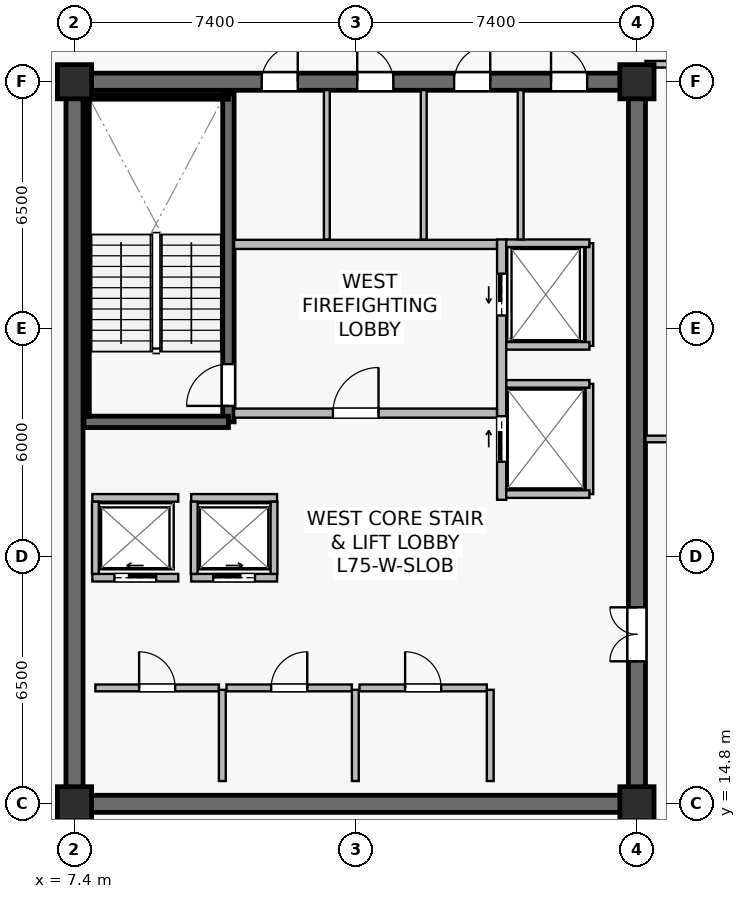
"""IFC4 building model, lengths in metres.
Left out: names, types, materials, properties, quantities, classifications, styles, units other than length and angle.
Written with IfcOpenShell. Run it as: python <this file> out.ifc"""

import sys

from ifc_helpers import new_model, si_unit, direction, frame, frame_2d, origin, origin_2d, place, context, subcontext, project, spatial, rectangle, extrude, source, transform, mapped, element, fill, save


model = new_model("IFC4")
c1 = context("Model", 3, precision=1e-05, world=origin(), true_north=direction((0.0, 1.0)))
c2 = subcontext(c1, "Body", "Model", "MODEL_VIEW")
j1 = project(units=[si_unit("LENGTHUNIT", "METRE"), si_unit("PLANEANGLEUNIT", "RADIAN")], contexts=[c1])
p1 = place(None, origin())
s1 = spatial("IfcSite", under=j1, at=p1, CompositionType="ELEMENT")
p2 = place(p1, origin())
s2 = spatial("IfcBuilding", under=s1, at=p2, CompositionType="ELEMENT")
p3 = place(p2, frame((0.0, 0.0, 314.4)))
s3 = spatial("IfcBuildingStorey", under=s2, at=p3, CompositionType="ELEMENT", Elevation=314.4)
p4 = place(p3, frame((7.175, 14.8, 0.0), z_axis=(0.0, 0.0, 1.0), x_axis=(1.0, 0.0, 0.0)))
e1 = element("IfcWall", 1, at=p4, inside=s3, PredefinedType="SHEAR", context=c2, shape_type="SweptSolid", body=[
    extrude(rectangle(XDim=15.25, YDim=0.45, at=frame_2d((7.625, 0.0))), origin(), (0.0, 0.0, 1.0), 3.9),
])
p5 = place(p3, frame((7.175, 33.8, 0.0), z_axis=(0.0, 0.0, 1.0), x_axis=(1.0, 0.0, 0.0)))
e2 = element("IfcWall", 2, at=p5, inside=s3, PredefinedType="SHEAR", context=c2, shape_type="SweptSolid", body=[
    extrude(rectangle(XDim=15.25, YDim=0.45, at=frame_2d((7.625, 0.0))), origin(), (0.0, 0.0, 1.0), 3.9),
])
p6 = place(p5, frame((5.15, 0.0, 0.0)))
e3 = element("IfcOpeningElement", 3, at=p6, cuts=e2, PredefinedType="OPENING", context=c2, shape_type="SweptSolid", body=[
    extrude(rectangle(XDim=0.95, YDim=2.15, at=frame_2d((0.475, 1.075))), frame((0.0, 0.235, 0.0), z_axis=(0.0, -1.0, 0.0), x_axis=(1.0, 0.0, 0.0)), (0.0, 0.0, 1.0), 0.47),
])
p7 = place(p5, frame((7.665, 0.0, 0.0)))
e4 = element("IfcOpeningElement", 4, at=p7, cuts=e2, PredefinedType="OPENING", context=c2, shape_type="SweptSolid", body=[
    extrude(rectangle(XDim=0.95, YDim=2.15, at=frame_2d((0.475, 1.075))), frame((0.0, 0.235, 0.0), z_axis=(0.0, -1.0, 0.0), x_axis=(1.0, 0.0, 0.0)), (0.0, 0.0, 1.0), 0.47),
])
p8 = place(p5, frame((10.215, 0.0, 0.0)))
e5 = element("IfcOpeningElement", 5, at=p8, cuts=e2, PredefinedType="OPENING", context=c2, shape_type="SweptSolid", body=[
    extrude(rectangle(XDim=0.95, YDim=2.15, at=frame_2d((0.475, 1.075))), frame((0.0, 0.235, 0.0), z_axis=(0.0, -1.0, 0.0), x_axis=(1.0, 0.0, 0.0)), (0.0, 0.0, 1.0), 0.47),
])
p9 = place(p5, frame((12.765, 0.0, 0.0)))
e6 = element("IfcOpeningElement", 6, at=p9, cuts=e2, PredefinedType="OPENING", context=c2, shape_type="SweptSolid", body=[
    extrude(rectangle(XDim=0.95, YDim=2.15, at=frame_2d((0.475, 1.075))), frame((0.0, 0.235, 0.0), z_axis=(0.0, -1.0, 0.0), x_axis=(1.0, 0.0, 0.0)), (0.0, 0.0, 1.0), 0.47),
])
p10 = place(p3, frame((7.4, 15.025, 0.0), z_axis=(0.0, 0.0, 1.0), x_axis=(0.0, 1.0, 0.0)))
e7 = element("IfcWall", 7, at=p10, inside=s3, PredefinedType="SHEAR", context=c2, shape_type="SweptSolid", body=[
    extrude(rectangle(XDim=18.55, YDim=0.45, at=frame_2d((9.275, 0.0))), origin(), (0.0, 0.0, 1.0), 3.9),
])
p11 = place(p3, frame((22.2, 15.025, 0.0), z_axis=(0.0, 0.0, 1.0), x_axis=(0.0, 1.0, 0.0)))
e8 = element("IfcWall", 8, at=p11, inside=s3, PredefinedType="SHEAR", context=c2, shape_type="SweptSolid", body=[
    extrude(rectangle(XDim=18.55, YDim=0.45, at=frame_2d((9.275, 0.0))), origin(), (0.0, 0.0, 1.0), 3.9),
])
p12 = place(p11, frame((3.525, 0.0, 0.0)))
e9 = element("IfcOpeningElement", 9, at=p12, cuts=e8, PredefinedType="OPENING", context=c2, shape_type="SweptSolid", body=[
    extrude(rectangle(XDim=1.42, YDim=2.2, at=frame_2d((0.71, 1.1))), frame((0.0, 0.235, 0.0), z_axis=(0.0, -1.0, 0.0), x_axis=(1.0, 0.0, 0.0)), (0.0, 0.0, 1.0), 0.47),
])
p13 = place(p3, frame((11.45, 24.85, 0.0), z_axis=(0.0, 0.0, 1.0), x_axis=(0.0, 1.0, 0.0)))
e10 = element("IfcWall", 10, at=p13, inside=s3, PredefinedType="SHEAR", context=c2, shape_type="SweptSolid", body=[
    extrude(rectangle(XDim=8.63, YDim=0.3, at=frame_2d((4.315, 0.0))), origin(), (0.0, 0.0, 1.0), 3.9),
])
p14 = place(p13, frame((0.42, 0.0, 0.0)))
e11 = element("IfcOpeningElement", 11, at=p14, cuts=e10, PredefinedType="OPENING", context=c2, shape_type="SweptSolid", body=[
    extrude(rectangle(XDim=1.1, YDim=2.15, at=frame_2d((0.55, 1.075))), frame((0.0, 0.16, 0.0), z_axis=(0.0, -1.0, 0.0), x_axis=(1.0, 0.0, 0.0)), (0.0, 0.0, 1.0), 0.32),
])
p15 = place(p3, frame((7.65, 24.85, 0.0), z_axis=(0.0, 0.0, 1.0), x_axis=(1.0, 0.0, 0.0)))
e12 = element("IfcWall", 12, at=p15, inside=s3, PredefinedType="SHEAR", context=c2, shape_type="SweptSolid", body=[
    extrude(rectangle(XDim=3.8, YDim=0.3, at=frame_2d((1.9, 0.0))), origin(), (0.0, 0.0, 1.0), 3.9),
])
p16 = place(p3, frame((7.73, 33.4, 0.0), z_axis=(0.0, 0.0, 1.0), x_axis=(1.0, 0.0, 0.0)))
e13 = element("IfcWall", 13, at=p16, inside=s3, PredefinedType="SOLIDWALL", context=c2, shape_type="SweptSolid", body=[
    extrude(rectangle(XDim=3.72, YDim=0.12, at=frame_2d((1.86, 0.0))), origin(), (0.0, 0.0, 1.0), 3.9),
])
p17 = place(p3, frame((7.73, 25.0, 0.0), z_axis=(0.0, 0.0, 1.0), x_axis=(0.0, 1.0, 0.0)))
e14 = element("IfcWall", 14, at=p17, inside=s3, PredefinedType="SOLIDWALL", context=c2, shape_type="SweptSolid", body=[
    extrude(rectangle(XDim=8.32, YDim=0.12, at=frame_2d((4.16, 0.0))), origin(), (0.0, 0.0, 1.0), 3.9),
])
m1 = source(origin(), c2, "Body", "SweptSolid", [
    extrude(rectangle(XDim=0.9, YDim=0.9, at=origin_2d()), origin(), (0.0, 0.0, 1.0), 4.2),
])
for number, where, z_axis, x_axis in (
    (15, (7.4, 14.8, 0.0), (0.0, 0.0, 1.0), (1.0, 0.0, 0.0)),
    (16, (22.2, 14.8, 0.0), (0.0, 0.0, 1.0), (1.0, 0.0, 0.0)),
    (17, (7.4, 33.8, 0.0), (0.0, 0.0, 1.0), (1.0, 0.0, 0.0)),
    (18, (22.2, 33.8, 0.0), (0.0, 0.0, 1.0), (1.0, 0.0, 0.0)),
):
    element("IfcColumn", number, at=place(p3, frame(where, z_axis=z_axis, x_axis=x_axis)), inside=s3, PredefinedType="COLUMN", context=c2, shape_type="MappedRepresentation", body=[
        mapped(m1, transform((0.0, 0.0, 0.0), scale=1.0)),
    ])
p18 = place(p3, frame((11.6, 25.08, 0.0), z_axis=(0.0, 0.0, 1.0), x_axis=(1.0, 0.0, 0.0)))
e19 = element("IfcWall", 19, at=p18, inside=s3, PredefinedType="SOLIDWALL", context=c2, shape_type="SweptSolid", body=[
    extrude(rectangle(XDim=6.92, YDim=0.24, at=frame_2d((3.46, 0.0))), origin(), (0.0, 0.0, 1.0), 3.297),
])
p19 = place(p18, frame((2.6, 0.0, 0.0)))
e20 = element("IfcOpeningElement", 20, at=p19, cuts=e19, PredefinedType="OPENING", context=c2, shape_type="SweptSolid", body=[
    extrude(rectangle(XDim=1.2, YDim=2.16, at=frame_2d((0.6, 1.08))), frame((0.0, 0.13, 0.0), z_axis=(0.0, -1.0, 0.0), x_axis=(1.0, 0.0, 0.0)), (0.0, 0.0, 1.0), 0.26),
])
p20 = place(p3, frame((11.6, 29.52, 0.0), z_axis=(0.0, 0.0, 1.0), x_axis=(1.0, 0.0, 0.0)))
e21 = element("IfcWall", 21, at=p20, inside=s3, PredefinedType="SOLIDWALL", context=c2, shape_type="SweptSolid", body=[
    extrude(rectangle(XDim=6.92, YDim=0.24, at=frame_2d((3.46, 0.0))), origin(), (0.0, 0.0, 1.0), 3.297),
])
p21 = place(p3, frame((18.64, 22.8, 0.0), z_axis=(0.0, 0.0, 1.0), x_axis=(0.0, 1.0, 0.0)))
e22 = element("IfcWall", 22, at=p21, inside=s3, PredefinedType="SOLIDWALL", context=c2, shape_type="SweptSolid", body=[
    extrude(rectangle(XDim=6.85, YDim=0.24, at=frame_2d((3.425, 0.0))), origin(), (0.0, 0.0, 1.0), 3.035),
])
p22 = place(p21, frame((4.85, 0.0, 0.0)))
e23 = element("IfcOpeningElement", 23, at=p22, cuts=e22, PredefinedType="OPENING", context=c2, shape_type="SweptSolid", body=[
    extrude(rectangle(XDim=1.1, YDim=2.22, at=frame_2d((0.55, 1.11))), frame((0.0, 0.13, 0.0), z_axis=(0.0, -1.0, 0.0), x_axis=(1.0, 0.0, 0.0)), (0.0, 0.0, 1.0), 0.26),
])
p23 = place(p21, frame((1.0, 0.0, 0.0)))
e24 = element("IfcOpeningElement", 24, at=p23, cuts=e22, PredefinedType="OPENING", context=c2, shape_type="SweptSolid", body=[
    extrude(rectangle(XDim=1.2, YDim=2.22, at=frame_2d((0.6, 1.11))), frame((0.0, 0.13, 0.0), z_axis=(0.0, -1.0, 0.0), x_axis=(1.0, 0.0, 0.0)), (0.0, 0.0, 1.0), 0.26),
])
p24 = place(p3, frame((7.87, 20.75, 0.0), z_axis=(0.0, 0.0, 1.0), x_axis=(1.0, 0.0, 0.0)))
e25 = element("IfcWall", 25, at=p24, inside=s3, PredefinedType="SOLIDWALL", context=c2, shape_type="SweptSolid", body=[
    extrude(rectangle(XDim=2.26, YDim=0.2, at=frame_2d((1.13, 0.0))), origin(), (0.0, 0.0, 1.0), 3.9),
])
p25 = place(p24, frame((0.58, 0.0, 0.0)))
e26 = element("IfcOpeningElement", 26, at=p25, cuts=e25, PredefinedType="OPENING", context=c2, shape_type="SweptSolid", body=[
    extrude(rectangle(XDim=1.1, YDim=2.22, at=frame_2d((0.55, 1.11))), frame((0.0, 0.11, 0.0), z_axis=(0.0, -1.0, 0.0), x_axis=(1.0, 0.0, 0.0)), (0.0, 0.0, 1.0), 0.22),
])
p26 = place(p3, frame((7.87, 22.85, 0.0), z_axis=(0.0, 0.0, 1.0), x_axis=(1.0, 0.0, 0.0)))
e27 = element("IfcWall", 27, at=p26, inside=s3, PredefinedType="SOLIDWALL", context=c2, shape_type="SweptSolid", body=[
    extrude(rectangle(XDim=2.26, YDim=0.2, at=frame_2d((1.13, 0.0))), origin(), (0.0, 0.0, 1.0), 3.9),
])
p27 = place(p3, frame((7.95, 20.85, 0.0), z_axis=(0.0, 0.0, 1.0), x_axis=(0.0, 1.0, 0.0)))
e28 = element("IfcWall", 28, at=p27, inside=s3, PredefinedType="SOLIDWALL", context=c2, shape_type="SweptSolid", body=[
    extrude(rectangle(XDim=1.9, YDim=0.18, at=frame_2d((0.95, 0.0))), origin(), (0.0, 0.0, 1.0), 3.9),
])
p28 = place(p3, frame((10.47, 20.75, 0.0), z_axis=(0.0, 0.0, 1.0), x_axis=(1.0, 0.0, 0.0)))
e29 = element("IfcWall", 29, at=p28, inside=s3, PredefinedType="SOLIDWALL", context=c2, shape_type="SweptSolid", body=[
    extrude(rectangle(XDim=2.26, YDim=0.2, at=frame_2d((1.13, 0.0))), origin(), (0.0, 0.0, 1.0), 3.9),
])
p29 = place(p28, frame((0.58, 0.0, 0.0)))
e30 = element("IfcOpeningElement", 30, at=p29, cuts=e29, PredefinedType="OPENING", context=c2, shape_type="SweptSolid", body=[
    extrude(rectangle(XDim=1.1, YDim=2.22, at=frame_2d((0.55, 1.11))), frame((0.0, 0.11, 0.0), z_axis=(0.0, -1.0, 0.0), x_axis=(1.0, 0.0, 0.0)), (0.0, 0.0, 1.0), 0.22),
])
p30 = place(p3, frame((10.47, 22.85, 0.0), z_axis=(0.0, 0.0, 1.0), x_axis=(1.0, 0.0, 0.0)))
e31 = element("IfcWall", 31, at=p30, inside=s3, PredefinedType="SOLIDWALL", context=c2, shape_type="SweptSolid", body=[
    extrude(rectangle(XDim=2.26, YDim=0.2, at=frame_2d((1.13, 0.0))), origin(), (0.0, 0.0, 1.0), 3.9),
])
for number, where, z_axis, x_axis in (
    (32, (10.55, 20.85, 0.0), (0.0, 0.0, 1.0), (0.0, 1.0, 0.0)),
    (33, (12.65, 20.85, 0.0), (0.0, 0.0, 1.0), (0.0, 1.0, 0.0)),
):
    element("IfcWall", number, at=place(p3, frame(where, z_axis=z_axis, x_axis=x_axis)), inside=s3, PredefinedType="SOLIDWALL", context=c2, shape_type="SweptSolid", body=[
        extrude(rectangle(XDim=1.9, YDim=0.18, at=frame_2d((0.95, 0.0))), origin(), (0.0, 0.0, 1.0), 3.9),
    ])
p31 = place(p3, frame((20.95, 26.85, 0.0), z_axis=(0.0, 0.0, 1.0), x_axis=(0.0, 1.0, 0.0)))
e34 = element("IfcWall", 34, at=p31, inside=s3, PredefinedType="SOLIDWALL", context=c2, shape_type="SweptSolid", body=[
    extrude(rectangle(XDim=2.7, YDim=0.2, at=frame_2d((1.35, 0.0))), origin(), (0.0, 0.0, 1.0), 3.9),
])
p32 = place(p3, frame((18.76, 29.55, 0.0), z_axis=(0.0, 0.0, 1.0), x_axis=(1.0, 0.0, 0.0)))
e35 = element("IfcWall", 35, at=p32, inside=s3, PredefinedType="SOLIDWALL", context=c2, shape_type="SweptSolid", body=[
    extrude(rectangle(XDim=2.19, YDim=0.2, at=frame_2d((1.095, 0.0))), origin(), (0.0, 0.0, 1.0), 3.9),
])
p33 = place(p3, frame((18.76, 26.85, 0.0), z_axis=(0.0, 0.0, 1.0), x_axis=(1.0, 0.0, 0.0)))
e36 = element("IfcWall", 36, at=p33, inside=s3, PredefinedType="SOLIDWALL", context=c2, shape_type="SweptSolid", body=[
    extrude(rectangle(XDim=2.19, YDim=0.2, at=frame_2d((1.095, 0.0))), origin(), (0.0, 0.0, 1.0), 3.297),
])
p34 = place(p3, frame((20.95, 22.95, 0.0), z_axis=(0.0, 0.0, 1.0), x_axis=(0.0, 1.0, 0.0)))
e37 = element("IfcWall", 37, at=p34, inside=s3, PredefinedType="SOLIDWALL", context=c2, shape_type="SweptSolid", body=[
    extrude(rectangle(XDim=2.9, YDim=0.2, at=frame_2d((1.45, 0.0))), origin(), (0.0, 0.0, 1.0), 3.035),
])
for number, where, z_axis, x_axis in (
    (38, (18.76, 25.85, 0.0), (0.0, 0.0, 1.0), (1.0, 0.0, 0.0)),
    (39, (18.76, 22.95, 0.0), (0.0, 0.0, 1.0), (1.0, 0.0, 0.0)),
):
    element("IfcWall", number, at=place(p3, frame(where, z_axis=z_axis, x_axis=x_axis)), inside=s3, PredefinedType="SOLIDWALL", context=c2, shape_type="SweptSolid", body=[
        extrude(rectangle(XDim=2.19, YDim=0.2, at=frame_2d((1.095, 0.0))), origin(), (0.0, 0.0, 1.0), 3.9),
    ])
p35 = place(p3, frame((7.95, 17.85, 0.0), z_axis=(0.0, 0.0, 1.0), x_axis=(1.0, 0.0, 0.0)))
e40 = element("IfcWall", 40, at=p35, inside=s3, PredefinedType="SOLIDWALL", context=c2, shape_type="SweptSolid", body=[
    extrude(rectangle(XDim=3.25, YDim=0.18, at=frame_2d((1.625, 0.0))), origin(), (0.0, 0.0, 1.0), 3.9),
])
p36 = place(p35, frame((1.15, 0.0, 0.0)))
e41 = element("IfcOpeningElement", 41, at=p36, cuts=e40, PredefinedType="OPENING", context=c2, shape_type="SweptSolid", body=[
    extrude(rectangle(XDim=0.95, YDim=2.15, at=frame_2d((0.475, 1.075))), frame((0.0, 0.1, 0.0), z_axis=(0.0, -1.0, 0.0), x_axis=(1.0, 0.0, 0.0)), (0.0, 0.0, 1.0), 0.2),
])
p37 = place(p3, frame((11.29, 15.4, 0.0), z_axis=(0.0, 0.0, 1.0), x_axis=(0.0, 1.0, 0.0)))
e42 = element("IfcWall", 42, at=p37, inside=s3, PredefinedType="SOLIDWALL", context=c2, shape_type="SweptSolid", body=[
    extrude(rectangle(XDim=2.4, YDim=0.18, at=frame_2d((1.2, 0.0))), origin(), (0.0, 0.0, 1.0), 3.9),
])
p38 = place(p3, frame((11.4, 17.85, 0.0), z_axis=(0.0, 0.0, 1.0), x_axis=(1.0, 0.0, 0.0)))
e43 = element("IfcWall", 43, at=p38, inside=s3, PredefinedType="SOLIDWALL", context=c2, shape_type="SweptSolid", body=[
    extrude(rectangle(XDim=3.3, YDim=0.18, at=frame_2d((1.65, 0.0))), origin(), (0.0, 0.0, 1.0), 3.297),
])
p39 = place(p38, frame((1.175, 0.0, 0.0)))
e44 = element("IfcOpeningElement", 44, at=p39, cuts=e43, PredefinedType="OPENING", context=c2, shape_type="SweptSolid", body=[
    extrude(rectangle(XDim=0.95, YDim=2.15, at=frame_2d((0.475, 1.075))), frame((0.0, 0.1, 0.0), z_axis=(0.0, -1.0, 0.0), x_axis=(1.0, 0.0, 0.0)), (0.0, 0.0, 1.0), 0.2),
])
p40 = place(p3, frame((14.79, 15.4, 0.0), z_axis=(0.0, 0.0, 1.0), x_axis=(0.0, 1.0, 0.0)))
e45 = element("IfcWall", 45, at=p40, inside=s3, PredefinedType="SOLIDWALL", context=c2, shape_type="SweptSolid", body=[
    extrude(rectangle(XDim=2.4, YDim=0.18, at=frame_2d((1.2, 0.0))), origin(), (0.0, 0.0, 1.0), 3.297),
])
p41 = place(p3, frame((14.9, 17.85, 0.0), z_axis=(0.0, 0.0, 1.0), x_axis=(1.0, 0.0, 0.0)))
e46 = element("IfcWall", 46, at=p41, inside=s3, PredefinedType="SOLIDWALL", context=c2, shape_type="SweptSolid", body=[
    extrude(rectangle(XDim=3.35, YDim=0.18, at=frame_2d((1.675, 0.0))), origin(), (0.0, 0.0, 1.0), 3.297),
])
p42 = place(p41, frame((1.2, 0.0, 0.0)))
e47 = element("IfcOpeningElement", 47, at=p42, cuts=e46, PredefinedType="OPENING", context=c2, shape_type="SweptSolid", body=[
    extrude(rectangle(XDim=0.95, YDim=2.15, at=frame_2d((0.475, 1.075))), frame((0.0, 0.1, 0.0), z_axis=(0.0, -1.0, 0.0), x_axis=(1.0, 0.0, 0.0)), (0.0, 0.0, 1.0), 0.2),
])
p43 = place(p3, frame((18.34, 15.4, 0.0), z_axis=(0.0, 0.0, 1.0), x_axis=(0.0, 1.0, 0.0)))
e48 = element("IfcWall", 48, at=p43, inside=s3, PredefinedType="SOLIDWALL", context=c2, shape_type="SweptSolid", body=[
    extrude(rectangle(XDim=2.4, YDim=0.18, at=frame_2d((1.2, 0.0))), origin(), (0.0, 0.0, 1.0), 3.9),
])
for number, where, z_axis, x_axis in (
    (49, (14.04, 29.65, 0.0), (0.0, 0.0, 1.0), (0.0, 1.0, 0.0)),
    (50, (16.59, 29.65, 0.0), (0.0, 0.0, 1.0), (0.0, 1.0, 0.0)),
    (51, (19.14, 29.65, 0.0), (0.0, 0.0, 1.0), (0.0, 1.0, 0.0)),
):
    element("IfcWall", number, at=place(p3, frame(where, z_axis=z_axis, x_axis=x_axis)), inside=s3, PredefinedType="PLUMBINGWALL", context=c2, shape_type="SweptSolid", body=[
        extrude(rectangle(XDim=3.93, YDim=0.155, at=frame_2d((1.965, 0.0))), origin(), (0.0, 0.0, 1.0), 3.9),
    ])
p44 = place(p3, frame((22.425, 34.26, 0.0), z_axis=(0.0, 0.0, 1.0), x_axis=(1.0, 0.0, 0.0)))
e52 = element("IfcWall", 52, at=p44, inside=s3, PredefinedType="PARTITIONING", context=c2, shape_type="SweptSolid", body=[
    extrude(rectangle(XDim=4.075, YDim=0.175, at=frame_2d((2.038, 0.0))), origin(), (0.0, 0.0, 1.0), 3.635),
])
p45 = place(p3, frame((22.425, 24.4, 0.0), z_axis=(0.0, 0.0, 1.0), x_axis=(1.0, 0.0, 0.0)))
e53 = element("IfcWall", 53, at=p45, inside=s3, PredefinedType="PARTITIONING", context=c2, shape_type="SweptSolid", body=[
    extrude(rectangle(XDim=4.075, YDim=0.175, at=frame_2d((2.038, 0.0))), origin(), (0.0, 0.0, 1.0), 3.9),
])
p46 = place(p45, frame((1.35, 0.0, 0.0)))
e54 = element("IfcOpeningElement", 54, at=p46, cuts=e53, PredefinedType="OPENING", context=c2, shape_type="SweptSolid", body=[
    extrude(rectangle(XDim=0.95, YDim=2.15, at=frame_2d((0.475, 1.075))), frame((0.0, 0.098, 0.0), z_axis=(0.0, -1.0, 0.0), x_axis=(1.0, 0.0, 0.0)), (0.0, 0.0, 1.0), 0.195),
])
m2 = source(origin(), c2, "Body", "SweptSolid", [
    extrude(rectangle(XDim=1.1, YDim=2.15, at=frame_2d((0.55, 1.075))), frame((0.0, 0.025, 0.0), z_axis=(0.0, -1.0, 0.0), x_axis=(1.0, 0.0, 0.0)), (0.0, 0.0, 1.0), 0.05),
])
p47 = place(p14, origin())
e55 = element("IfcDoor", 55, at=p47, inside=s3, OperationType="SINGLE_SWING_LEFT", PredefinedType="DOOR", context=c2, shape_type="MappedRepresentation", body=[
    mapped(m2, transform((0.0, 0.0, 0.0), scale=1.0)),
])
fill(e11, e55)
m3 = source(origin(), c2, "Body", "SweptSolid", [
    extrude(rectangle(XDim=1.2, YDim=2.16, at=frame_2d((0.6, 1.08))), frame((0.0, 0.025, 0.0), z_axis=(0.0, -1.0, 0.0), x_axis=(1.0, 0.0, 0.0)), (0.0, 0.0, 1.0), 0.05),
])
p48 = place(p19, origin())
e56 = element("IfcDoor", 56, at=p48, inside=s3, OperationType="SINGLE_SWING_RIGHT", PredefinedType="DOOR", context=c2, shape_type="MappedRepresentation", body=[
    mapped(m3, transform((0.0, 0.0, 0.0), scale=1.0)),
])
fill(e20, e56)
m4 = source(origin(), c2, "Body", "SweptSolid", [
    extrude(rectangle(XDim=1.1, YDim=2.22, at=frame_2d((0.55, 1.11))), frame((0.0, 0.025, 0.0), z_axis=(0.0, -1.0, 0.0), x_axis=(1.0, 0.0, 0.0)), (0.0, 0.0, 1.0), 0.05),
])
p49 = place(p25, origin())
e57 = element("IfcDoor", 57, at=p49, inside=s3, OperationType="SLIDING_TO_LEFT", PredefinedType="USERDEFINED", context=c2, shape_type="MappedRepresentation", body=[
    mapped(m4, transform((0.0, 0.0, 0.0), scale=1.0)),
])
fill(e26, e57)
p50 = place(p29, origin())
e58 = element("IfcDoor", 58, at=p50, inside=s3, OperationType="SLIDING_TO_RIGHT", PredefinedType="USERDEFINED", context=c2, shape_type="MappedRepresentation", body=[
    mapped(m4, transform((0.0, 0.0, 0.0), scale=1.0)),
])
fill(e30, e58)
p51 = place(p22, origin())
e59 = element("IfcDoor", 59, at=p51, inside=s3, OperationType="SLIDING_TO_LEFT", PredefinedType="USERDEFINED", context=c2, shape_type="MappedRepresentation", body=[
    mapped(m4, transform((0.0, 0.0, 0.0), scale=1.0)),
])
fill(e23, e59)
m5 = source(origin(), c2, "Body", "SweptSolid", [
    extrude(rectangle(XDim=1.2, YDim=2.22, at=frame_2d((0.6, 1.11))), frame((0.0, 0.025, 0.0), z_axis=(0.0, -1.0, 0.0), x_axis=(1.0, 0.0, 0.0)), (0.0, 0.0, 1.0), 0.05),
])
p52 = place(p23, origin())
e60 = element("IfcDoor", 60, at=p52, inside=s3, OperationType="SLIDING_TO_RIGHT", PredefinedType="USERDEFINED", context=c2, shape_type="MappedRepresentation", body=[
    mapped(m5, transform((0.0, 0.0, 0.0), scale=1.0)),
])
fill(e24, e60)
m6 = source(origin(), c2, "Body", "SweptSolid", [
    extrude(rectangle(XDim=0.95, YDim=2.15, at=frame_2d((0.475, 1.075))), frame((0.0, 0.025, 0.0), z_axis=(0.0, -1.0, 0.0), x_axis=(1.0, 0.0, 0.0)), (0.0, 0.0, 1.0), 0.05),
])
p53 = place(p36, origin())
e61 = element("IfcDoor", 61, at=p53, inside=s3, OperationType="SINGLE_SWING_LEFT", PredefinedType="DOOR", context=c2, shape_type="MappedRepresentation", body=[
    mapped(m6, transform((0.0, 0.0, 0.0), scale=1.0)),
])
fill(e41, e61)
p54 = place(p39, origin())
e62 = element("IfcDoor", 62, at=p54, inside=s3, OperationType="SINGLE_SWING_RIGHT", PredefinedType="DOOR", context=c2, shape_type="MappedRepresentation", body=[
    mapped(m6, transform((0.0, 0.0, 0.0), scale=1.0)),
])
fill(e44, e62)
p55 = place(p42, origin())
e63 = element("IfcDoor", 63, at=p55, inside=s3, OperationType="SINGLE_SWING_LEFT", PredefinedType="DOOR", context=c2, shape_type="MappedRepresentation", body=[
    mapped(m6, transform((0.0, 0.0, 0.0), scale=1.0)),
])
fill(e47, e63)
m7 = source(origin(), c2, "Body", "SweptSolid", [
    extrude(rectangle(XDim=1.42, YDim=2.2, at=frame_2d((0.71, 1.1))), frame((0.0, 0.025, 0.0), z_axis=(0.0, -1.0, 0.0), x_axis=(1.0, 0.0, 0.0)), (0.0, 0.0, 1.0), 0.05),
])
p56 = place(p12, origin())
e64 = element("IfcDoor", 64, at=p56, inside=s3, OperationType="DOUBLE_DOOR_SINGLE_SWING", PredefinedType="DOOR", context=c2, shape_type="MappedRepresentation", body=[
    mapped(m7, transform((0.0, 0.0, 0.0), scale=1.0)),
])
fill(e9, e64)
p57 = place(p6, origin())
e65 = element("IfcDoor", 65, at=p57, inside=s3, OperationType="SINGLE_SWING_RIGHT", PredefinedType="DOOR", context=c2, shape_type="MappedRepresentation", body=[
    mapped(m6, transform((0.0, 0.0, 0.0), scale=1.0)),
])
fill(e3, e65)
p58 = place(p7, origin())
e66 = element("IfcDoor", 66, at=p58, inside=s3, OperationType="SINGLE_SWING_LEFT", PredefinedType="DOOR", context=c2, shape_type="MappedRepresentation", body=[
    mapped(m6, transform((0.0, 0.0, 0.0), scale=1.0)),
])
fill(e4, e66)
p59 = place(p8, origin())
e67 = element("IfcDoor", 67, at=p59, inside=s3, OperationType="SINGLE_SWING_RIGHT", PredefinedType="DOOR", context=c2, shape_type="MappedRepresentation", body=[
    mapped(m6, transform((0.0, 0.0, 0.0), scale=1.0)),
])
fill(e5, e67)
p60 = place(p9, origin())
e68 = element("IfcDoor", 68, at=p60, inside=s3, OperationType="SINGLE_SWING_LEFT", PredefinedType="DOOR", context=c2, shape_type="MappedRepresentation", body=[
    mapped(m6, transform((0.0, 0.0, 0.0), scale=1.0)),
])
fill(e6, e68)
save(model, sys.argv[1])
